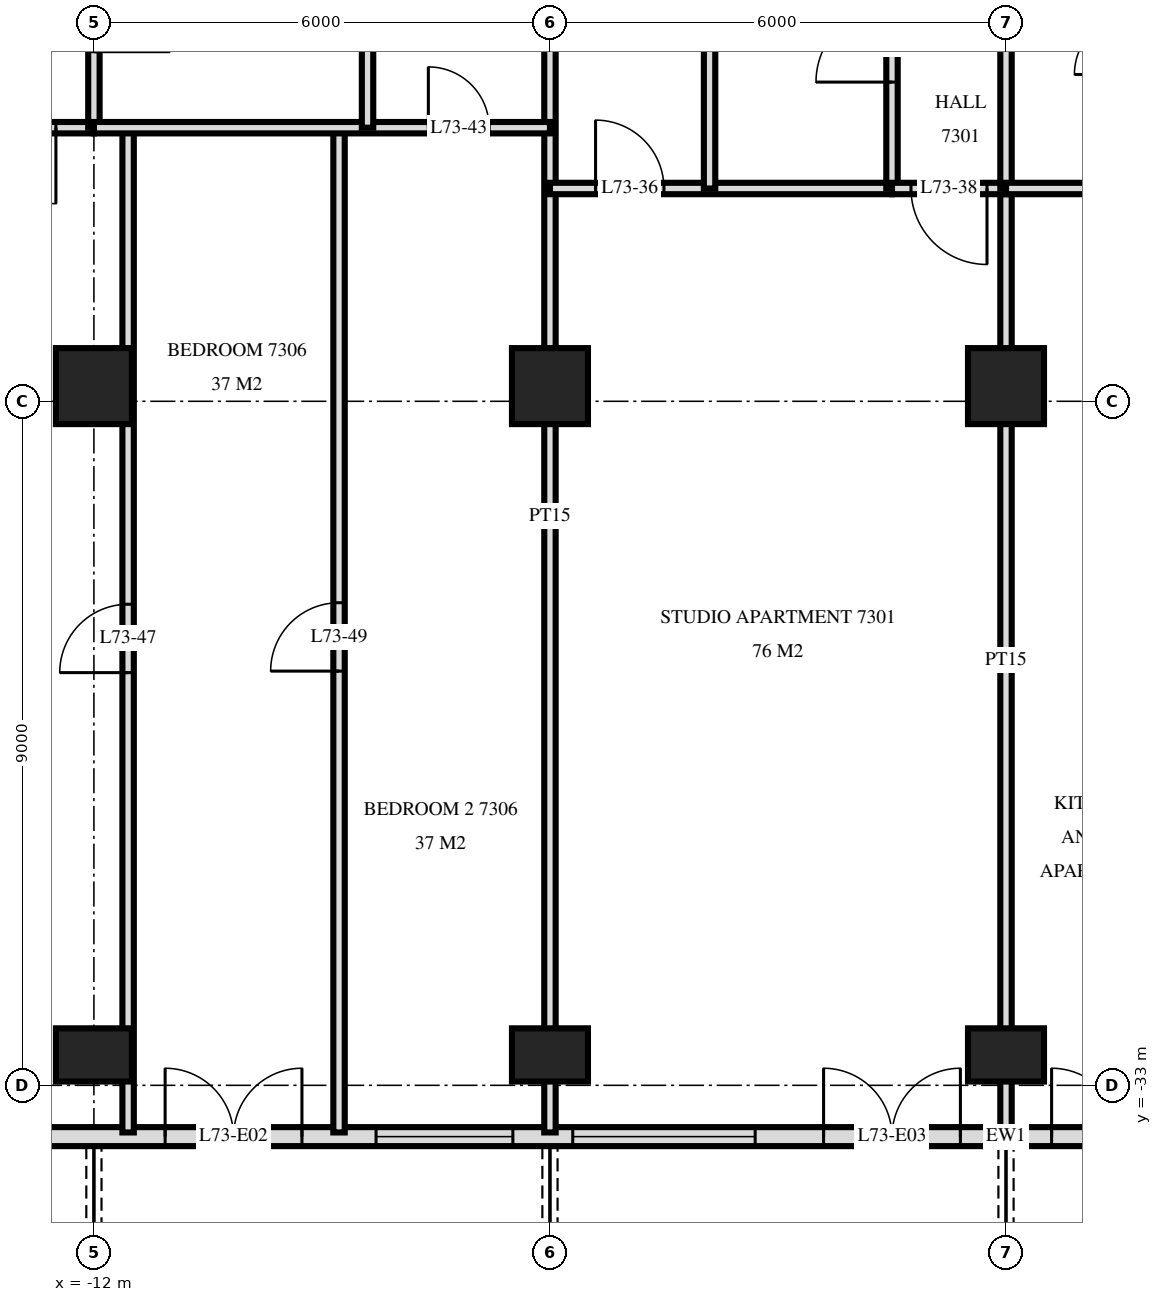
"""IFC4 building model, lengths in metres.
Left out: names, types, materials, properties, quantities, classifications, styles, units other than length and angle.
Written with IfcOpenShell. Run it as: python <this file> out.ifc"""

import sys

from ifc_helpers import new_model, si_unit, direction, frame, frame_2d, origin, origin_2d, place, context, subcontext, project, spatial, rectangle, extrude, element, fill, save


model = new_model("IFC4")
c1 = context("Model", 3, precision=1e-05, world=origin(), true_north=direction((0.0, 1.0)))
c2 = subcontext(c1, "Body", "Model", "MODEL_VIEW")
j1 = project(units=[si_unit("LENGTHUNIT", "METRE"), si_unit("PLANEANGLEUNIT", "RADIAN")], contexts=[c1])
p1 = place(None, origin())
s1 = spatial("IfcSite", under=j1, at=p1, CompositionType="ELEMENT")
p2 = place(p1, origin())
s2 = spatial("IfcBuilding", under=s1, at=p2, CompositionType="ELEMENT")
p3 = place(p2, frame((0.0, 0.0, 277.1)))
s3 = spatial("IfcBuildingStorey", under=s2, at=p3, CompositionType="ELEMENT", Elevation=277.1)
p4 = place(p3, frame((-12.0, -32.6, 0.0), z_axis=(0.0, 0.0, 1.0), x_axis=(1.0, 0.0, 0.0)))
e1 = element("IfcColumn", 1, at=p4, inside=s3, PredefinedType="COLUMN", context=c2, shape_type="SweptSolid", body=[
    extrude(rectangle(XDim=1.0, YDim=0.7, at=origin_2d()), origin(), (0.0, 0.0, 1.0), 3.5),
])
p5 = place(p3, frame((-12.0, -23.8, 0.0), z_axis=(0.0, 0.0, 1.0), x_axis=(1.0, 0.0, 0.0)))
e2 = element("IfcColumn", 2, at=p5, inside=s3, PredefinedType="COLUMN", context=c2, shape_type="SweptSolid", body=[
    extrude(rectangle(XDim=1.0, YDim=1.0, at=origin_2d()), origin(), (0.0, 0.0, 1.0), 3.5),
])
p6 = place(p3, frame((-6.0, -32.6, 0.0), z_axis=(0.0, 0.0, 1.0), x_axis=(1.0, 0.0, 0.0)))
e3 = element("IfcColumn", 3, at=p6, inside=s3, PredefinedType="COLUMN", context=c2, shape_type="SweptSolid", body=[
    extrude(rectangle(XDim=1.0, YDim=0.7, at=origin_2d()), origin(), (0.0, 0.0, 1.0), 3.5),
])
p7 = place(p3, frame((-6.0, -23.8, 0.0), z_axis=(0.0, 0.0, 1.0), x_axis=(1.0, 0.0, 0.0)))
e4 = element("IfcColumn", 4, at=p7, inside=s3, PredefinedType="COLUMN", context=c2, shape_type="SweptSolid", body=[
    extrude(rectangle(XDim=1.0, YDim=1.0, at=origin_2d()), origin(), (0.0, 0.0, 1.0), 3.5),
])
p8 = place(p3, frame((0.0, -32.6, 0.0), z_axis=(0.0, 0.0, 1.0), x_axis=(1.0, 0.0, 0.0)))
e5 = element("IfcColumn", 5, at=p8, inside=s3, PredefinedType="COLUMN", context=c2, shape_type="SweptSolid", body=[
    extrude(rectangle(XDim=1.0, YDim=0.7, at=origin_2d()), origin(), (0.0, 0.0, 1.0), 3.5),
])
p9 = place(p3, frame((0.0, -23.8, 0.0), z_axis=(0.0, 0.0, 1.0), x_axis=(1.0, 0.0, 0.0)))
e6 = element("IfcColumn", 6, at=p9, inside=s3, PredefinedType="COLUMN", context=c2, shape_type="SweptSolid", body=[
    extrude(rectangle(XDim=1.0, YDim=1.0, at=origin_2d()), origin(), (0.0, 0.0, 1.0), 3.5),
])
p10 = place(p3, frame((-18.575, -33.675, 0.0), z_axis=(0.0, 0.0, 1.0), x_axis=(1.0, 0.0, 0.0)))
e7 = element("IfcWall", 7, at=p10, inside=s3, PredefinedType="SOLIDWALL", context=c2, shape_type="SweptSolid", body=[
    extrude(rectangle(XDim=37.151, YDim=0.25, at=frame_2d((18.575, 0.0))), origin(), (0.0, 0.0, 1.0), 3.22),
])
p11 = place(p10, frame((4.175, 0.0, 0.0)))
e8 = element("IfcOpeningElement", 8, at=p11, cuts=e7, PredefinedType="OPENING", context=c2, shape_type="SweptSolid", body=[
    extrude(rectangle(XDim=1.8, YDim=2.4, at=frame_2d((0.9, 1.2))), frame((0.0, 0.135, 0.0), z_axis=(0.0, -1.0, 0.0), x_axis=(1.0, 0.0, 0.0)), (0.0, 0.0, 1.0), 0.27),
])
p12 = place(p10, frame((7.512, 0.0, 0.0)))
e9 = element("IfcOpeningElement", 9, at=p12, cuts=e7, PredefinedType="OPENING", context=c2, shape_type="SweptSolid", body=[
    extrude(rectangle(XDim=1.8, YDim=2.4, at=frame_2d((0.9, 1.2))), frame((0.0, 0.135, 0.0), z_axis=(0.0, -1.0, 0.0), x_axis=(1.0, 0.0, 0.0)), (0.0, 0.0, 1.0), 0.27),
])
p13 = place(p10, frame((10.287, 0.0, 0.9)))
e10 = element("IfcOpeningElement", 10, at=p13, cuts=e7, PredefinedType="OPENING", context=c2, shape_type="SweptSolid", body=[
    extrude(rectangle(XDim=1.8, YDim=1.5, at=frame_2d((0.9, 0.75))), frame((0.0, 0.135, 0.0), z_axis=(0.0, -1.0, 0.0), x_axis=(1.0, 0.0, 0.0)), (0.0, 0.0, 1.0), 0.27),
])
p14 = place(p10, frame((12.875, 0.0, 0.9)))
e11 = element("IfcOpeningElement", 11, at=p14, cuts=e7, PredefinedType="OPENING", context=c2, shape_type="SweptSolid", body=[
    extrude(rectangle(XDim=2.4, YDim=1.5, at=frame_2d((1.2, 0.75))), frame((0.0, 0.135, 0.0), z_axis=(0.0, -1.0, 0.0), x_axis=(1.0, 0.0, 0.0)), (0.0, 0.0, 1.0), 0.27),
])
p15 = place(p10, frame((16.175, 0.0, 0.0)))
e12 = element("IfcOpeningElement", 12, at=p15, cuts=e7, PredefinedType="OPENING", context=c2, shape_type="SweptSolid", body=[
    extrude(rectangle(XDim=1.8, YDim=2.4, at=frame_2d((0.9, 1.2))), frame((0.0, 0.135, 0.0), z_axis=(0.0, -1.0, 0.0), x_axis=(1.0, 0.0, 0.0)), (0.0, 0.0, 1.0), 0.27),
])
p16 = place(p10, frame((19.175, 0.0, 0.0)))
e13 = element("IfcOpeningElement", 13, at=p16, cuts=e7, PredefinedType="OPENING", context=c2, shape_type="SweptSolid", body=[
    extrude(rectangle(XDim=1.8, YDim=2.4, at=frame_2d((0.9, 1.2))), frame((0.0, 0.135, 0.0), z_axis=(0.0, -1.0, 0.0), x_axis=(1.0, 0.0, 0.0)), (0.0, 0.0, 1.0), 0.27),
])
p17 = place(p10, frame((21.875, 0.0, 0.9)))
e14 = element("IfcOpeningElement", 14, at=p17, cuts=e7, PredefinedType="OPENING", context=c2, shape_type="SweptSolid", body=[
    extrude(rectangle(XDim=2.4, YDim=1.5, at=frame_2d((1.2, 0.75))), frame((0.0, 0.135, 0.0), z_axis=(0.0, -1.0, 0.0), x_axis=(1.0, 0.0, 0.0)), (0.0, 0.0, 1.0), 0.27),
])
p18 = place(p10, frame((25.175, 0.0, 0.0)))
e15 = element("IfcOpeningElement", 15, at=p18, cuts=e7, PredefinedType="OPENING", context=c2, shape_type="SweptSolid", body=[
    extrude(rectangle(XDim=1.8, YDim=2.4, at=frame_2d((0.9, 1.2))), frame((0.0, 0.135, 0.0), z_axis=(0.0, -1.0, 0.0), x_axis=(1.0, 0.0, 0.0)), (0.0, 0.0, 1.0), 0.27),
])
p19 = place(p10, frame((27.875, 0.0, 0.9)))
e16 = element("IfcOpeningElement", 16, at=p19, cuts=e7, PredefinedType="OPENING", context=c2, shape_type="SweptSolid", body=[
    extrude(rectangle(XDim=2.4, YDim=1.5, at=frame_2d((1.2, 0.75))), frame((0.0, 0.135, 0.0), z_axis=(0.0, -1.0, 0.0), x_axis=(1.0, 0.0, 0.0)), (0.0, 0.0, 1.0), 0.27),
])
p20 = place(p10, frame((30.95, 0.0, 0.9)))
e17 = element("IfcOpeningElement", 17, at=p20, cuts=e7, PredefinedType="OPENING", context=c2, shape_type="SweptSolid", body=[
    extrude(rectangle(XDim=1.8, YDim=1.5, at=frame_2d((0.9, 0.75))), frame((0.0, 0.135, 0.0), z_axis=(0.0, -1.0, 0.0), x_axis=(1.0, 0.0, 0.0)), (0.0, 0.0, 1.0), 0.27),
])
p21 = place(p10, frame((34.175, 0.0, 0.0)))
e18 = element("IfcOpeningElement", 18, at=p21, cuts=e7, PredefinedType="OPENING", context=c2, shape_type="SweptSolid", body=[
    extrude(rectangle(XDim=1.8, YDim=2.4, at=frame_2d((0.9, 1.2))), frame((0.0, 0.135, 0.0), z_axis=(0.0, -1.0, 0.0), x_axis=(1.0, 0.0, 0.0)), (0.0, 0.0, 1.0), 0.27),
])
p22 = place(p3, frame((0.0, -21.2, 0.0), z_axis=(0.0, 0.0, 1.0), x_axis=(0.0, 1.0, 0.0)))
e19 = element("IfcWall", 19, at=p22, inside=s3, PredefinedType="PARTITIONING", context=c2, shape_type="SweptSolid", body=[
    extrude(rectangle(XDim=3.8, YDim=0.15, at=frame_2d((1.9, 0.0))), origin(), (0.0, 0.0, 1.0), 3.22),
])
p23 = place(p3, frame((0.0, -33.62, 0.0), z_axis=(0.0, 0.0, 1.0), x_axis=(0.0, 1.0, 0.0)))
e20 = element("IfcWall", 20, at=p23, inside=s3, PredefinedType="PARTITIONING", context=c2, shape_type="SweptSolid", body=[
    extrude(rectangle(XDim=12.42, YDim=0.15, at=frame_2d((6.21, 0.0))), origin(), (0.0, 0.0, 1.0), 3.22),
])
p24 = place(p3, frame((-1.5, -21.2, 0.0), z_axis=(0.0, 0.0, 1.0), x_axis=(0.0, 1.0, 0.0)))
e21 = element("IfcWall", 21, at=p24, inside=s3, PredefinedType="PARTITIONING", context=c2, shape_type="SweptSolid", body=[
    extrude(rectangle(XDim=3.8, YDim=0.15, at=frame_2d((1.9, 0.0))), origin(), (0.0, 0.0, 1.0), 3.22),
])
p25 = place(p24, frame((1.4, 0.0, 0.0)))
e22 = element("IfcOpeningElement", 22, at=p25, cuts=e21, PredefinedType="OPENING", context=c2, shape_type="SweptSolid", body=[
    extrude(rectangle(XDim=1.0, YDim=2.1, at=frame_2d((0.5, 1.05))), frame((0.0, 0.085, 0.0), z_axis=(0.0, -1.0, 0.0), x_axis=(1.0, 0.0, 0.0)), (0.0, 0.0, 1.0), 0.17),
])
p26 = place(p3, frame((-3.9, -21.2, 0.0), z_axis=(0.0, 0.0, 1.0), x_axis=(0.0, 1.0, 0.0)))
e23 = element("IfcWall", 23, at=p26, inside=s3, PredefinedType="PARTITIONING", context=c2, shape_type="SweptSolid", body=[
    extrude(rectangle(XDim=3.8, YDim=0.15, at=frame_2d((1.9, 0.0))), origin(), (0.0, 0.0, 1.0), 3.22),
])
p27 = place(p3, frame((-6.0, -33.62, 0.0), z_axis=(0.0, 0.0, 1.0), x_axis=(0.0, 1.0, 0.0)))
e24 = element("IfcWall", 24, at=p27, inside=s3, PredefinedType="PARTITIONING", context=c2, shape_type="SweptSolid", body=[
    extrude(rectangle(XDim=16.22, YDim=0.15, at=frame_2d((8.11, 0.0))), origin(), (0.0, 0.0, 1.0), 3.22),
])
p28 = place(p3, frame((-8.4, -20.4, 0.0), z_axis=(0.0, 0.0, 1.0), x_axis=(0.0, 1.0, 0.0)))
e25 = element("IfcWall", 25, at=p28, inside=s3, PredefinedType="PARTITIONING", context=c2, shape_type="SweptSolid", body=[
    extrude(rectangle(XDim=3.0, YDim=0.15, at=frame_2d((1.5, 0.0))), origin(), (0.0, 0.0, 1.0), 3.22),
])
p29 = place(p3, frame((-8.775, -33.62, 0.0), z_axis=(0.0, 0.0, 1.0), x_axis=(0.0, 1.0, 0.0)))
e26 = element("IfcWall", 26, at=p29, inside=s3, PredefinedType="PARTITIONING", context=c2, shape_type="SweptSolid", body=[
    extrude(rectangle(XDim=13.22, YDim=0.15, at=frame_2d((6.61, 0.0))), origin(), (0.0, 0.0, 1.0), 3.22),
])
p30 = place(p29, frame((6.07, 0.0, 0.0)))
e27 = element("IfcOpeningElement", 27, at=p30, cuts=e26, PredefinedType="OPENING", context=c2, shape_type="SweptSolid", body=[
    extrude(rectangle(XDim=0.9, YDim=2.1, at=frame_2d((0.45, 1.05))), frame((0.0, 0.085, 0.0), z_axis=(0.0, -1.0, 0.0), x_axis=(1.0, 0.0, 0.0)), (0.0, 0.0, 1.0), 0.17),
])
p31 = place(p3, frame((-11.55, -33.62, 0.0), z_axis=(0.0, 0.0, 1.0), x_axis=(0.0, 1.0, 0.0)))
e28 = element("IfcWall", 28, at=p31, inside=s3, PredefinedType="PARTITIONING", context=c2, shape_type="SweptSolid", body=[
    extrude(rectangle(XDim=13.22, YDim=0.15, at=frame_2d((6.61, 0.0))), origin(), (0.0, 0.0, 1.0), 3.22),
])
p32 = place(p31, frame((6.05, 0.0, 0.0)))
e29 = element("IfcOpeningElement", 29, at=p32, cuts=e28, PredefinedType="OPENING", context=c2, shape_type="SweptSolid", body=[
    extrude(rectangle(XDim=0.9, YDim=2.1, at=frame_2d((0.45, 1.05))), frame((0.0, 0.085, 0.0), z_axis=(0.0, -1.0, 0.0), x_axis=(1.0, 0.0, 0.0)), (0.0, 0.0, 1.0), 0.17),
])
p33 = place(p3, frame((-12.0, -20.4, 0.0), z_axis=(0.0, 0.0, 1.0), x_axis=(0.0, 1.0, 0.0)))
e30 = element("IfcWall", 30, at=p33, inside=s3, PredefinedType="PARTITIONING", context=c2, shape_type="SweptSolid", body=[
    extrude(rectangle(XDim=3.0, YDim=0.15, at=frame_2d((1.5, 0.0))), origin(), (0.0, 0.0, 1.0), 3.22),
])
p34 = place(p33, frame((1.0, 0.0, 0.0)))
e31 = element("IfcOpeningElement", 31, at=p34, cuts=e30, PredefinedType="OPENING", context=c2, shape_type="SweptSolid", body=[
    extrude(rectangle(XDim=1.0, YDim=2.1, at=frame_2d((0.5, 1.05))), frame((0.0, 0.085, 0.0), z_axis=(0.0, -1.0, 0.0), x_axis=(1.0, 0.0, 0.0)), (0.0, 0.0, 1.0), 0.17),
])
p35 = place(p3, frame((-1.5, -21.2, 0.0), z_axis=(0.0, 0.0, 1.0), x_axis=(1.0, 0.0, 0.0)))
e32 = element("IfcWall", 32, at=p35, inside=s3, PredefinedType="PARTITIONING", context=c2, shape_type="SweptSolid", body=[
    extrude(rectangle(XDim=1.5, YDim=0.15, at=frame_2d((0.75, 0.0))), origin(), (0.0, 0.0, 1.0), 3.22),
])
p36 = place(p35, frame((0.25, 0.0, 0.0)))
e33 = element("IfcOpeningElement", 33, at=p36, cuts=e32, PredefinedType="OPENING", context=c2, shape_type="SweptSolid", body=[
    extrude(rectangle(XDim=1.0, YDim=2.1, at=frame_2d((0.5, 1.05))), frame((0.0, 0.085, 0.0), z_axis=(0.0, -1.0, 0.0), x_axis=(1.0, 0.0, 0.0)), (0.0, 0.0, 1.0), 0.17),
])
p37 = place(p3, frame((-6.0, -21.2, 0.0), z_axis=(0.0, 0.0, 1.0), x_axis=(1.0, 0.0, 0.0)))
e34 = element("IfcWall", 34, at=p37, inside=s3, PredefinedType="PARTITIONING", context=c2, shape_type="SweptSolid", body=[
    extrude(rectangle(XDim=4.5, YDim=0.15, at=frame_2d((2.25, 0.0))), origin(), (0.0, 0.0, 1.0), 3.22),
])
p38 = place(p37, frame((0.6, 0.0, 0.0)))
e35 = element("IfcOpeningElement", 35, at=p38, cuts=e34, PredefinedType="OPENING", context=c2, shape_type="SweptSolid", body=[
    extrude(rectangle(XDim=0.9, YDim=2.1, at=frame_2d((0.45, 1.05))), frame((0.0, 0.085, 0.0), z_axis=(0.0, -1.0, 0.0), x_axis=(1.0, 0.0, 0.0)), (0.0, 0.0, 1.0), 0.17),
])
p39 = place(p3, frame((0.0, -21.2, 0.0), z_axis=(0.0, 0.0, 1.0), x_axis=(1.0, 0.0, 0.0)))
e36 = element("IfcWall", 36, at=p39, inside=s3, PredefinedType="PARTITIONING", context=c2, shape_type="SweptSolid", body=[
    extrude(rectangle(XDim=1.7, YDim=0.15, at=frame_2d((0.85, 0.0))), origin(), (0.0, 0.0, 1.0), 3.22),
])
p40 = place(p3, frame((-14.0, -20.4, 0.0), z_axis=(0.0, 0.0, 1.0), x_axis=(1.0, 0.0, 0.0)))
e37 = element("IfcWall", 37, at=p40, inside=s3, PredefinedType="PARTITIONING", context=c2, shape_type="SweptSolid", body=[
    extrude(rectangle(XDim=2.0, YDim=0.15, at=frame_2d((1.0, 0.0))), origin(), (0.0, 0.0, 1.0), 3.22),
])
p41 = place(p40, frame((0.5, 0.0, 0.0)))
e38 = element("IfcOpeningElement", 38, at=p41, cuts=e37, PredefinedType="OPENING", context=c2, shape_type="SweptSolid", body=[
    extrude(rectangle(XDim=1.0, YDim=2.1, at=frame_2d((0.5, 1.05))), frame((0.0, 0.085, 0.0), z_axis=(0.0, -1.0, 0.0), x_axis=(1.0, 0.0, 0.0)), (0.0, 0.0, 1.0), 0.17),
])
p42 = place(p3, frame((-12.0, -20.4, 0.0), z_axis=(0.0, 0.0, 1.0), x_axis=(1.0, 0.0, 0.0)))
e39 = element("IfcWall", 39, at=p42, inside=s3, PredefinedType="PARTITIONING", context=c2, shape_type="SweptSolid", body=[
    extrude(rectangle(XDim=6.0, YDim=0.15, at=frame_2d((3.0, 0.0))), origin(), (0.0, 0.0, 1.0), 3.22),
])
p43 = place(p42, frame((4.4, 0.0, 0.0)))
e40 = element("IfcOpeningElement", 40, at=p43, cuts=e39, PredefinedType="OPENING", context=c2, shape_type="SweptSolid", body=[
    extrude(rectangle(XDim=0.8, YDim=2.1, at=frame_2d((0.4, 1.05))), frame((0.0, 0.085, 0.0), z_axis=(0.0, -1.0, 0.0), x_axis=(1.0, 0.0, 0.0)), (0.0, 0.0, 1.0), 0.17),
])
p44 = place(p12, origin())
e41 = element("IfcDoor", 41, at=p44, inside=s3, OperationType="DOUBLE_DOOR_SINGLE_SWING", PredefinedType="DOOR", context=c2, shape_type="SweptSolid", body=[
    extrude(rectangle(XDim=1.8, YDim=2.4, at=frame_2d((0.9, 1.2))), frame((0.0, 0.025, 0.0), z_axis=(0.0, -1.0, 0.0), x_axis=(1.0, 0.0, 0.0)), (0.0, 0.0, 1.0), 0.05),
])
fill(e9, e41)
p45 = place(p13, origin())
e42 = element("IfcWindow", 42, at=p45, inside=s3, PartitioningType="SINGLE_PANEL", PredefinedType="WINDOW", context=c2, shape_type="SweptSolid", body=[
    extrude(rectangle(XDim=1.8, YDim=1.5, at=frame_2d((0.9, 0.75))), frame((0.0, 0.03, 0.0), z_axis=(0.0, -1.0, 0.0), x_axis=(1.0, 0.0, 0.0)), (0.0, 0.0, 1.0), 0.06),
])
fill(e10, e42)
p46 = place(p14, origin())
e43 = element("IfcWindow", 43, at=p46, inside=s3, PartitioningType="SINGLE_PANEL", PredefinedType="WINDOW", context=c2, shape_type="SweptSolid", body=[
    extrude(rectangle(XDim=2.4, YDim=1.5, at=frame_2d((1.2, 0.75))), frame((0.0, 0.03, 0.0), z_axis=(0.0, -1.0, 0.0), x_axis=(1.0, 0.0, 0.0)), (0.0, 0.0, 1.0), 0.06),
])
fill(e11, e43)
p47 = place(p15, origin())
e44 = element("IfcDoor", 44, at=p47, inside=s3, OperationType="DOUBLE_DOOR_SINGLE_SWING", PredefinedType="DOOR", context=c2, shape_type="SweptSolid", body=[
    extrude(rectangle(XDim=1.8, YDim=2.4, at=frame_2d((0.9, 1.2))), frame((0.0, 0.025, 0.0), z_axis=(0.0, -1.0, 0.0), x_axis=(1.0, 0.0, 0.0)), (0.0, 0.0, 1.0), 0.05),
])
fill(e12, e44)
p48 = place(p16, origin())
e45 = element("IfcDoor", 45, at=p48, inside=s3, OperationType="DOUBLE_DOOR_SINGLE_SWING", PredefinedType="DOOR", context=c2, shape_type="SweptSolid", body=[
    extrude(rectangle(XDim=1.8, YDim=2.4, at=frame_2d((0.9, 1.2))), frame((0.0, 0.025, 0.0), z_axis=(0.0, -1.0, 0.0), x_axis=(1.0, 0.0, 0.0)), (0.0, 0.0, 1.0), 0.05),
])
fill(e13, e45)
p49 = place(p38, origin())
e46 = element("IfcDoor", 46, at=p49, inside=s3, OperationType="SINGLE_SWING_RIGHT", PredefinedType="DOOR", context=c2, shape_type="SweptSolid", body=[
    extrude(rectangle(XDim=0.9, YDim=2.1, at=frame_2d((0.45, 1.05))), frame((0.0, 0.025, 0.0), z_axis=(0.0, -1.0, 0.0), x_axis=(1.0, 0.0, 0.0)), (0.0, 0.0, 1.0), 0.05),
])
fill(e35, e46)
p50 = place(p25, origin())
e47 = element("IfcDoor", 47, at=p50, inside=s3, OperationType="SINGLE_SWING_RIGHT", PredefinedType="DOOR", context=c2, shape_type="SweptSolid", body=[
    extrude(rectangle(XDim=1.0, YDim=2.1, at=frame_2d((0.5, 1.05))), frame((0.0, 0.025, 0.0), z_axis=(0.0, -1.0, 0.0), x_axis=(1.0, 0.0, 0.0)), (0.0, 0.0, 1.0), 0.05),
])
fill(e22, e47)
p51 = place(p36, frame((0.5, 0.0, 0.0), z_axis=(0.0, 0.0, 1.0), x_axis=(-1.0, 0.0, 0.0)))
e48 = element("IfcDoor", 48, at=p51, inside=s3, OperationType="SINGLE_SWING_RIGHT", PredefinedType="DOOR", context=c2, shape_type="SweptSolid", body=[
    extrude(rectangle(XDim=1.0, YDim=2.1, at=frame_2d((0.0, 1.05))), frame((0.0, -0.025, 0.0), z_axis=(0.0, 1.0, 0.0), x_axis=(-1.0, 0.0, 0.0)), (0.0, 0.0, 1.0), 0.05),
])
fill(e33, e48)
p52 = place(p43, origin())
e49 = element("IfcDoor", 49, at=p52, inside=s3, OperationType="SINGLE_SWING_RIGHT", PredefinedType="DOOR", context=c2, shape_type="SweptSolid", body=[
    extrude(rectangle(XDim=0.8, YDim=2.1, at=frame_2d((0.4, 1.05))), frame((0.0, 0.025, 0.0), z_axis=(0.0, -1.0, 0.0), x_axis=(1.0, 0.0, 0.0)), (0.0, 0.0, 1.0), 0.05),
])
fill(e40, e49)
p53 = place(p41, frame((0.5, 0.0, 0.0), z_axis=(0.0, 0.0, 1.0), x_axis=(-1.0, 0.0, 0.0)))
e50 = element("IfcDoor", 50, at=p53, inside=s3, OperationType="SINGLE_SWING_RIGHT", PredefinedType="DOOR", context=c2, shape_type="SweptSolid", body=[
    extrude(rectangle(XDim=1.0, YDim=2.1, at=frame_2d((0.0, 1.05))), frame((0.0, -0.025, 0.0), z_axis=(0.0, 1.0, 0.0), x_axis=(-1.0, 0.0, 0.0)), (0.0, 0.0, 1.0), 0.05),
])
fill(e38, e50)
p54 = place(p32, origin())
e51 = element("IfcDoor", 51, at=p54, inside=s3, OperationType="SINGLE_SWING_RIGHT", PredefinedType="DOOR", context=c2, shape_type="SweptSolid", body=[
    extrude(rectangle(XDim=0.9, YDim=2.1, at=frame_2d((0.45, 1.05))), frame((0.0, 0.025, 0.0), z_axis=(0.0, -1.0, 0.0), x_axis=(1.0, 0.0, 0.0)), (0.0, 0.0, 1.0), 0.05),
])
fill(e29, e51)
p55 = place(p30, origin())
e52 = element("IfcDoor", 52, at=p55, inside=s3, OperationType="SINGLE_SWING_RIGHT", PredefinedType="DOOR", context=c2, shape_type="SweptSolid", body=[
    extrude(rectangle(XDim=0.9, YDim=2.1, at=frame_2d((0.45, 1.05))), frame((0.0, 0.025, 0.0), z_axis=(0.0, -1.0, 0.0), x_axis=(1.0, 0.0, 0.0)), (0.0, 0.0, 1.0), 0.05),
])
fill(e27, e52)
save(model, sys.argv[1])
